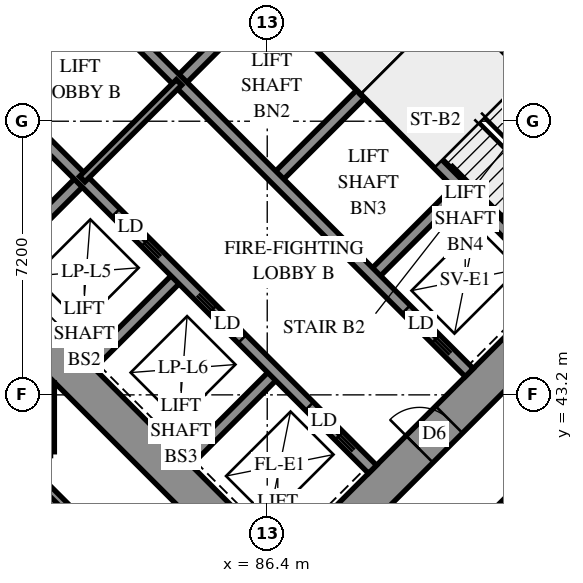
"""IFC4 building model, lengths in metres.
Left out: names, types, materials, properties, quantities, classifications, styles, units other than length and angle.
Written with IfcOpenShell. Run it as: python <this file> out.ifc"""

import sys

from ifc_helpers import new_model, si_unit, direction, frame, frame_2d, origin, place, context, subcontext, project, spatial, polyline, rectangle, outline, extrude, element, fill, save


model = new_model("IFC4")
c1 = context("Model", 3, precision=1e-05, world=origin(), true_north=direction((0.0, 1.0)))
c2 = subcontext(c1, "Body", "Model", "MODEL_VIEW")
j1 = project(units=[si_unit("LENGTHUNIT", "METRE"), si_unit("PLANEANGLEUNIT", "RADIAN")], contexts=[c1])
p1 = place(None, origin())
s1 = spatial("IfcSite", under=j1, at=p1, CompositionType="ELEMENT")
p2 = place(p1, origin())
s2 = spatial("IfcBuilding", under=s1, at=p2, CompositionType="ELEMENT")
p3 = place(p2, frame((0.0, 0.0, 10.2)))
s3 = spatial("IfcBuildingStorey", under=s2, at=p3, CompositionType="ELEMENT", Elevation=10.2)
p4 = place(p3, frame((75.594, 49.443, -0.4), z_axis=(0.0, 0.0, 1.0), x_axis=(0.7071037324, -0.70710983, 0.0)))
e1 = element("IfcWall", 1, at=p4, inside=s3, PredefinedType="SHEAR", context=c2, shape_type="SweptSolid", body=[
    extrude(rectangle(XDim=16.4, YDim=1.0, at=frame_2d((8.2, 0.0))), origin(), (0.0, 0.0, 1.0), 3.5),
])
p5 = place(p3, frame((86.483, 60.333, -0.4), z_axis=(0.0, 0.0, 1.0), x_axis=(0.70710983, -0.7071037324, 0.0)))
e2 = element("IfcWall", 2, at=p5, inside=s3, PredefinedType="SHEAR", context=c2, shape_type="SweptSolid", body=[
    extrude(rectangle(XDim=16.4, YDim=1.0, at=frame_2d((8.2, 0.0))), origin(), (0.0, 0.0, 1.0), 3.5),
])
p6 = place(p5, frame((11.0, 0.0, 0.4)))
e3 = element("IfcOpeningElement", 3, at=p6, cuts=e2, PredefinedType="OPENING", context=c2, shape_type="SweptSolid", body=[
    extrude(rectangle(XDim=0.8, YDim=2.1, at=frame_2d((0.4, 1.05))), frame((0.0, 0.51, 0.0), z_axis=(0.0, -1.0, 0.0), x_axis=(1.0, 0.0, 0.0)), (0.0, 0.0, 1.0), 1.02),
])
p7 = place(p3, frame((76.301, 49.443, -0.4), z_axis=(0.0, 0.0, 1.0), x_axis=(0.7071067812, 0.7071067812, 0.0)))
e4 = element("IfcWall", 4, at=p7, inside=s3, PredefinedType="SHEAR", context=c2, shape_type="SweptSolid", body=[
    extrude(rectangle(XDim=14.4, YDim=1.0, at=frame_2d((7.2, 0.0))), origin(), (0.0, 0.0, 1.0), 3.5),
])
p8 = place(p7, frame((4.55, 0.0, 0.4)))
e5 = element("IfcOpeningElement", 5, at=p8, cuts=e4, PredefinedType="OPENING", context=c2, shape_type="SweptSolid", body=[
    extrude(rectangle(XDim=1.1, YDim=2.1, at=frame_2d((0.55, 1.05))), frame((0.0, 0.51, 0.0), z_axis=(0.0, -1.0, 0.0), x_axis=(1.0, 0.0, 0.0)), (0.0, 0.0, 1.0), 1.02),
])
p9 = place(p7, frame((11.35, 0.0, 0.4)))
e6 = element("IfcOpeningElement", 6, at=p9, cuts=e4, PredefinedType="OPENING", context=c2, shape_type="SweptSolid", body=[
    extrude(rectangle(XDim=1.1, YDim=2.1, at=frame_2d((0.55, 1.05))), frame((0.0, 0.51, 0.0), z_axis=(0.0, -1.0, 0.0), x_axis=(1.0, 0.0, 0.0)), (0.0, 0.0, 1.0), 1.02),
])
p10 = place(p3, frame((87.19, 38.554, -0.4), z_axis=(0.0, 0.0, 1.0), x_axis=(0.707103309, 0.7071102534, 0.0)))
e7 = element("IfcWall", 7, at=p10, inside=s3, PredefinedType="SHEAR", context=c2, shape_type="SweptSolid", body=[
    extrude(rectangle(XDim=14.4, YDim=1.0, at=frame_2d((7.2, 0.0))), origin(), (0.0, 0.0, 1.0), 3.5),
])
p11 = place(p10, frame((4.55, 0.0, 0.4)))
e8 = element("IfcOpeningElement", 8, at=p11, cuts=e7, PredefinedType="OPENING", context=c2, shape_type="SweptSolid", body=[
    extrude(rectangle(XDim=1.1, YDim=2.1, at=frame_2d((0.55, 1.05))), frame((0.0, 0.51, 0.0), z_axis=(0.0, -1.0, 0.0), x_axis=(1.0, 0.0, 0.0)), (0.0, 0.0, 1.0), 1.02),
])
p12 = place(p10, frame((11.35, 0.0, 0.4)))
e9 = element("IfcOpeningElement", 9, at=p12, cuts=e7, PredefinedType="OPENING", context=c2, shape_type="SweptSolid", body=[
    extrude(rectangle(XDim=1.1, YDim=2.1, at=frame_2d((0.55, 1.05))), frame((0.0, 0.51, 0.0), z_axis=(0.0, -1.0, 0.0), x_axis=(1.0, 0.0, 0.0)), (0.0, 0.0, 1.0), 1.02),
])
for number, where, z_axis, x_axis in (
    (10, (79.2, 46.544, 0.0), (0.0, 0.0, 1.0), (0.707, 0.707, 0.0)),
    (11, (84.079, 51.423, 0.0), (0.0, 0.0, 1.0), (0.707, 0.707, 0.0)),
):
    element("IfcWall", number, at=place(p3, frame(where, z_axis=z_axis, x_axis=x_axis)), inside=s3, PredefinedType="SOLIDWALL", context=c2, shape_type="SweptSolid", body=[
        extrude(rectangle(XDim=3.3, YDim=0.3, at=frame_2d((1.65, 0.0))), origin(), (0.0, 0.0, 1.0), 3.8),
    ])
p13 = place(p3, frame((81.746, 43.999, 0.0), z_axis=(0.0, 0.0, 1.0), x_axis=(0.7071067812, 0.7071067812, 0.0)))
e12 = element("IfcWall", 12, at=p13, inside=s3, PredefinedType="SOLIDWALL", context=c2, shape_type="SweptSolid", body=[
    extrude(rectangle(XDim=3.3, YDim=0.3, at=frame_2d((1.65, 0.0))), origin(), (0.0, 0.0, 1.0), 3.8),
])
p14 = place(p3, frame((86.625, 48.878, 0.0), z_axis=(0.0, 0.0, 1.0), x_axis=(0.7071067812, 0.7071067812, 0.0)))
e13 = element("IfcWall", 13, at=p14, inside=s3, PredefinedType="SOLIDWALL", context=c2, shape_type="SweptSolid", body=[
    extrude(rectangle(XDim=3.3, YDim=0.3, at=frame_2d((1.65, 0.0))), origin(), (0.0, 0.0, 1.0), 3.8),
])
p15 = place(p3, frame((84.291, 41.453, 0.0), z_axis=(0.0, 0.0, 1.0), x_axis=(0.7071067812, 0.7071067812, 0.0)))
e14 = element("IfcWall", 14, at=p15, inside=s3, PredefinedType="SOLIDWALL", context=c2, shape_type="SweptSolid", body=[
    extrude(rectangle(XDim=3.3, YDim=0.3, at=frame_2d((1.65, 0.0))), origin(), (0.0, 0.0, 1.0), 3.8),
])
p16 = place(p3, frame((89.17, 46.332, 0.0), z_axis=(0.0, 0.0, 1.0), x_axis=(0.7071067812, 0.7071067812, 0.0)))
e15 = element("IfcWall", 15, at=p16, inside=s3, PredefinedType="SOLIDWALL", context=c2, shape_type="SweptSolid", body=[
    extrude(rectangle(XDim=3.3, YDim=0.3, at=frame_2d((1.65, 0.0))), origin(), (0.0, 0.0, 1.0), 3.8),
])
p17 = place(p3, frame((78.988, 51.423, 0.0), z_axis=(0.0, 0.0, 1.0), x_axis=(0.7071067812, -0.7071067812, 0.0)))
e16 = element("IfcWall", 16, at=p17, inside=s3, PredefinedType="SOLIDWALL", context=c2, shape_type="SweptSolid", body=[
    extrude(rectangle(XDim=14.4, YDim=0.3, at=frame_2d((7.2, 0.0))), origin(), (0.0, 0.0, 1.0), 3.8),
])
p18 = place(p17, frame((1.25, 0.0, 0.0)))
e17 = element("IfcOpeningElement", 17, at=p18, cuts=e16, PredefinedType="OPENING", context=c2, shape_type="SweptSolid", body=[
    extrude(rectangle(XDim=1.1, YDim=2.1, at=frame_2d((0.55, 1.05))), frame((0.0, 0.16, 0.0), z_axis=(0.0, -1.0, 0.0), x_axis=(1.0, 0.0, 0.0)), (0.0, 0.0, 1.0), 0.32),
])
p19 = place(p17, frame((4.85, 0.0, 0.0)))
e18 = element("IfcOpeningElement", 18, at=p19, cuts=e16, PredefinedType="OPENING", context=c2, shape_type="SweptSolid", body=[
    extrude(rectangle(XDim=1.1, YDim=2.1, at=frame_2d((0.55, 1.05))), frame((0.0, 0.16, 0.0), z_axis=(0.0, -1.0, 0.0), x_axis=(1.0, 0.0, 0.0)), (0.0, 0.0, 1.0), 0.32),
])
p20 = place(p17, frame((8.45, 0.0, 0.0)))
e19 = element("IfcOpeningElement", 19, at=p20, cuts=e16, PredefinedType="OPENING", context=c2, shape_type="SweptSolid", body=[
    extrude(rectangle(XDim=1.1, YDim=2.1, at=frame_2d((0.55, 1.05))), frame((0.0, 0.16, 0.0), z_axis=(0.0, -1.0, 0.0), x_axis=(1.0, 0.0, 0.0)), (0.0, 0.0, 1.0), 0.32),
])
p21 = place(p17, frame((12.05, 0.0, 0.0)))
e20 = element("IfcOpeningElement", 20, at=p21, cuts=e16, PredefinedType="OPENING", context=c2, shape_type="SweptSolid", body=[
    extrude(rectangle(XDim=1.1, YDim=2.1, at=frame_2d((0.55, 1.05))), frame((0.0, 0.16, 0.0), z_axis=(0.0, -1.0, 0.0), x_axis=(1.0, 0.0, 0.0)), (0.0, 0.0, 1.0), 0.32),
])
p22 = place(p3, frame((81.534, 53.969, 0.0), z_axis=(0.0, 0.0, 1.0), x_axis=(0.707103309, -0.7071102534, 0.0)))
e21 = element("IfcWall", 21, at=p22, inside=s3, PredefinedType="SOLIDWALL", context=c2, shape_type="SweptSolid", body=[
    extrude(rectangle(XDim=14.4, YDim=0.3, at=frame_2d((7.2, 0.0))), origin(), (0.0, 0.0, 1.0), 3.8),
])
p23 = place(p22, frame((12.05, 0.0, 0.0)))
e22 = element("IfcOpeningElement", 22, at=p23, cuts=e21, PredefinedType="OPENING", context=c2, shape_type="SweptSolid", body=[
    extrude(rectangle(XDim=1.1, YDim=2.1, at=frame_2d((0.55, 1.05))), frame((0.0, 0.16, 0.0), z_axis=(0.0, -1.0, 0.0), x_axis=(1.0, 0.0, 0.0)), (0.0, 0.0, 1.0), 0.32),
])
for number, where, z_axis, x_axis in (
    (23, (83.867, 56.302, 0.0), (0.0, 0.0, 1.0), (0.707, -0.707, 0.0)),
    (24, (88.958, 51.211, 0.0), (0.0, 0.0, 1.0), (0.707, -0.707, 0.0)),
):
    element("IfcWall", number, at=place(p3, frame(where, z_axis=z_axis, x_axis=x_axis)), inside=s3, PredefinedType="SOLIDWALL", context=c2, shape_type="SweptSolid", body=[
        extrude(rectangle(XDim=7.2, YDim=0.3, at=frame_2d((3.6, 0.0))), origin(), (0.0, 0.0, 1.0), 3.8),
    ])
p24 = place(p3, frame((88.958, 51.211, 0.0), z_axis=(0.0, 0.0, 1.0), x_axis=(0.7071067812, 0.7071067812, 0.0)))
e25 = element("IfcWall", 25, at=p24, inside=s3, PredefinedType="SOLIDWALL", context=c2, shape_type="SweptSolid", body=[
    extrude(rectangle(XDim=4.2, YDim=0.3, at=frame_2d((2.1, 0.0))), origin(), (0.0, 0.0, 1.0), 3.8),
])
p25 = place(p3, frame((117.843, 34.665, 0.0), z_axis=(0.0, 0.0, 1.0), x_axis=(-0.7071067812, 0.7071067812, 0.0)))
e26 = element("IfcWall", 26, at=p25, inside=s3, PredefinedType="SOLIDWALL", context=c2, shape_type="SweptSolid", body=[
    extrude(outline(polyline([(-0.275, -0.275), (54.222, -0.275), (53.994, 0.275), (0.275, 0.275), (-0.275, -0.275)])), origin(), (0.0, 0.0, 1.0), 3.8),
])
p26 = place(p25, frame((0.8, 0.0, 0.7)))
e27 = element("IfcOpeningElement", 27, at=p26, cuts=e26, PredefinedType="OPENING", context=c2, shape_type="SweptSolid", body=[
    extrude(rectangle(XDim=1.8, YDim=2.6, at=frame_2d((0.9, 1.3))), frame((0.0, 0.285, 0.0), z_axis=(0.0, -1.0, 0.0), x_axis=(1.0, 0.0, 0.0)), (0.0, 0.0, 1.0), 0.57),
])
p27 = place(p25, frame((4.225, 0.0, 0.7)))
e28 = element("IfcOpeningElement", 28, at=p27, cuts=e26, PredefinedType="OPENING", context=c2, shape_type="SweptSolid", body=[
    extrude(rectangle(XDim=1.8, YDim=2.6, at=frame_2d((0.9, 1.3))), frame((0.0, 0.285, 0.0), z_axis=(0.0, -1.0, 0.0), x_axis=(1.0, 0.0, 0.0)), (0.0, 0.0, 1.0), 0.57),
])
p28 = place(p25, frame((7.825, 0.0, 0.7)))
e29 = element("IfcOpeningElement", 29, at=p28, cuts=e26, PredefinedType="OPENING", context=c2, shape_type="SweptSolid", body=[
    extrude(rectangle(XDim=1.8, YDim=2.6, at=frame_2d((0.9, 1.3))), frame((0.0, 0.285, 0.0), z_axis=(0.0, -1.0, 0.0), x_axis=(1.0, 0.0, 0.0)), (0.0, 0.0, 1.0), 0.57),
])
p29 = place(p25, frame((11.425, 0.0, 0.7)))
e30 = element("IfcOpeningElement", 30, at=p29, cuts=e26, PredefinedType="OPENING", context=c2, shape_type="SweptSolid", body=[
    extrude(rectangle(XDim=1.8, YDim=2.6, at=frame_2d((0.9, 1.3))), frame((0.0, 0.285, 0.0), z_axis=(0.0, -1.0, 0.0), x_axis=(1.0, 0.0, 0.0)), (0.0, 0.0, 1.0), 0.57),
])
p30 = place(p25, frame((15.025, 0.0, 0.7)))
e31 = element("IfcOpeningElement", 31, at=p30, cuts=e26, PredefinedType="OPENING", context=c2, shape_type="SweptSolid", body=[
    extrude(rectangle(XDim=1.8, YDim=2.6, at=frame_2d((0.9, 1.3))), frame((0.0, 0.285, 0.0), z_axis=(0.0, -1.0, 0.0), x_axis=(1.0, 0.0, 0.0)), (0.0, 0.0, 1.0), 0.57),
])
p31 = place(p25, frame((18.625, 0.0, 0.7)))
e32 = element("IfcOpeningElement", 32, at=p31, cuts=e26, PredefinedType="OPENING", context=c2, shape_type="SweptSolid", body=[
    extrude(rectangle(XDim=1.8, YDim=2.6, at=frame_2d((0.9, 1.3))), frame((0.0, 0.285, 0.0), z_axis=(0.0, -1.0, 0.0), x_axis=(1.0, 0.0, 0.0)), (0.0, 0.0, 1.0), 0.57),
])
p32 = place(p25, frame((22.225, 0.0, 0.7)))
e33 = element("IfcOpeningElement", 33, at=p32, cuts=e26, PredefinedType="OPENING", context=c2, shape_type="SweptSolid", body=[
    extrude(rectangle(XDim=1.8, YDim=2.6, at=frame_2d((0.9, 1.3))), frame((0.0, 0.285, 0.0), z_axis=(0.0, -1.0, 0.0), x_axis=(1.0, 0.0, 0.0)), (0.0, 0.0, 1.0), 0.57),
])
p33 = place(p25, frame((25.825, 0.0, 0.7)))
e34 = element("IfcOpeningElement", 34, at=p33, cuts=e26, PredefinedType="OPENING", context=c2, shape_type="SweptSolid", body=[
    extrude(rectangle(XDim=1.8, YDim=2.6, at=frame_2d((0.9, 1.3))), frame((0.0, 0.285, 0.0), z_axis=(0.0, -1.0, 0.0), x_axis=(1.0, 0.0, 0.0)), (0.0, 0.0, 1.0), 0.57),
])
p34 = place(p25, frame((29.425, 0.0, 0.7)))
e35 = element("IfcOpeningElement", 35, at=p34, cuts=e26, PredefinedType="OPENING", context=c2, shape_type="SweptSolid", body=[
    extrude(rectangle(XDim=1.8, YDim=2.6, at=frame_2d((0.9, 1.3))), frame((0.0, 0.285, 0.0), z_axis=(0.0, -1.0, 0.0), x_axis=(1.0, 0.0, 0.0)), (0.0, 0.0, 1.0), 0.57),
])
p35 = place(p25, frame((33.025, 0.0, 0.7)))
e36 = element("IfcOpeningElement", 36, at=p35, cuts=e26, PredefinedType="OPENING", context=c2, shape_type="SweptSolid", body=[
    extrude(rectangle(XDim=1.8, YDim=2.6, at=frame_2d((0.9, 1.3))), frame((0.0, 0.285, 0.0), z_axis=(0.0, -1.0, 0.0), x_axis=(1.0, 0.0, 0.0)), (0.0, 0.0, 1.0), 0.57),
])
p36 = place(p25, frame((36.625, 0.0, 0.7)))
e37 = element("IfcOpeningElement", 37, at=p36, cuts=e26, PredefinedType="OPENING", context=c2, shape_type="SweptSolid", body=[
    extrude(rectangle(XDim=1.8, YDim=2.6, at=frame_2d((0.9, 1.3))), frame((0.0, 0.285, 0.0), z_axis=(0.0, -1.0, 0.0), x_axis=(1.0, 0.0, 0.0)), (0.0, 0.0, 1.0), 0.57),
])
p37 = place(p25, frame((40.225, 0.0, 0.7)))
e38 = element("IfcOpeningElement", 38, at=p37, cuts=e26, PredefinedType="OPENING", context=c2, shape_type="SweptSolid", body=[
    extrude(rectangle(XDim=1.8, YDim=2.6, at=frame_2d((0.9, 1.3))), frame((0.0, 0.285, 0.0), z_axis=(0.0, -1.0, 0.0), x_axis=(1.0, 0.0, 0.0)), (0.0, 0.0, 1.0), 0.57),
])
p38 = place(p25, frame((43.825, 0.0, 0.7)))
e39 = element("IfcOpeningElement", 39, at=p38, cuts=e26, PredefinedType="OPENING", context=c2, shape_type="SweptSolid", body=[
    extrude(rectangle(XDim=1.8, YDim=2.6, at=frame_2d((0.9, 1.3))), frame((0.0, 0.285, 0.0), z_axis=(0.0, -1.0, 0.0), x_axis=(1.0, 0.0, 0.0)), (0.0, 0.0, 1.0), 0.57),
])
p39 = place(p25, frame((47.425, 0.0, 0.7)))
e40 = element("IfcOpeningElement", 40, at=p39, cuts=e26, PredefinedType="OPENING", context=c2, shape_type="SweptSolid", body=[
    extrude(rectangle(XDim=1.8, YDim=2.6, at=frame_2d((0.9, 1.3))), frame((0.0, 0.285, 0.0), z_axis=(0.0, -1.0, 0.0), x_axis=(1.0, 0.0, 0.0)), (0.0, 0.0, 1.0), 0.57),
])
p40 = place(p25, frame((50.96, 0.0, 0.7)))
e41 = element("IfcOpeningElement", 41, at=p40, cuts=e26, PredefinedType="OPENING", context=c2, shape_type="SweptSolid", body=[
    extrude(rectangle(XDim=1.8, YDim=2.6, at=frame_2d((0.9, 1.3))), frame((0.0, 0.285, 0.0), z_axis=(0.0, -1.0, 0.0), x_axis=(1.0, 0.0, 0.0)), (0.0, 0.0, 1.0), 0.57),
])
p41 = place(p3, frame((77.07, 42.275, 0.0), z_axis=(0.0, 0.0, 1.0), x_axis=(0.7071067812, -0.7071067812, 0.0)))
e42 = element("IfcWall", 42, at=p41, inside=s3, PredefinedType="SOLIDWALL", context=c2, shape_type="SweptSolid", body=[
    extrude(outline(polyline([(0.114, -0.275), (39.288, -0.275), (38.737, 0.275), (-0.114, 0.275), (0.114, -0.275)])), origin(), (0.0, 0.0, 1.0), 3.8),
])
p42 = place(p41, frame((2.837, 0.0, 0.7)))
e43 = element("IfcOpeningElement", 43, at=p42, cuts=e42, PredefinedType="OPENING", context=c2, shape_type="SweptSolid", body=[
    extrude(rectangle(XDim=1.8, YDim=2.6, at=frame_2d((0.9, 1.3))), frame((0.0, 0.285, 0.0), z_axis=(0.0, -1.0, 0.0), x_axis=(1.0, 0.0, 0.0)), (0.0, 0.0, 1.0), 0.57),
])
p43 = place(p41, frame((6.588, 0.0, 0.7)))
e44 = element("IfcOpeningElement", 44, at=p43, cuts=e42, PredefinedType="OPENING", context=c2, shape_type="SweptSolid", body=[
    extrude(rectangle(XDim=1.8, YDim=2.6, at=frame_2d((0.9, 1.3))), frame((0.0, 0.285, 0.0), z_axis=(0.0, -1.0, 0.0), x_axis=(1.0, 0.0, 0.0)), (0.0, 0.0, 1.0), 0.57),
])
p44 = place(p41, frame((10.188, 0.0, 0.7)))
e45 = element("IfcOpeningElement", 45, at=p44, cuts=e42, PredefinedType="OPENING", context=c2, shape_type="SweptSolid", body=[
    extrude(rectangle(XDim=1.8, YDim=2.6, at=frame_2d((0.9, 1.3))), frame((0.0, 0.285, 0.0), z_axis=(0.0, -1.0, 0.0), x_axis=(1.0, 0.0, 0.0)), (0.0, 0.0, 1.0), 0.57),
])
p45 = place(p41, frame((13.787, 0.0, 0.7)))
e46 = element("IfcOpeningElement", 46, at=p45, cuts=e42, PredefinedType="OPENING", context=c2, shape_type="SweptSolid", body=[
    extrude(rectangle(XDim=1.8, YDim=2.6, at=frame_2d((0.9, 1.3))), frame((0.0, 0.285, 0.0), z_axis=(0.0, -1.0, 0.0), x_axis=(1.0, 0.0, 0.0)), (0.0, 0.0, 1.0), 0.57),
])
p46 = place(p41, frame((17.387, 0.0, 0.7)))
e47 = element("IfcOpeningElement", 47, at=p46, cuts=e42, PredefinedType="OPENING", context=c2, shape_type="SweptSolid", body=[
    extrude(rectangle(XDim=1.8, YDim=2.6, at=frame_2d((0.9, 1.3))), frame((0.0, 0.285, 0.0), z_axis=(0.0, -1.0, 0.0), x_axis=(1.0, 0.0, 0.0)), (0.0, 0.0, 1.0), 0.57),
])
p47 = place(p41, frame((20.988, 0.0, 0.7)))
e48 = element("IfcOpeningElement", 48, at=p47, cuts=e42, PredefinedType="OPENING", context=c2, shape_type="SweptSolid", body=[
    extrude(rectangle(XDim=1.8, YDim=2.6, at=frame_2d((0.9, 1.3))), frame((0.0, 0.285, 0.0), z_axis=(0.0, -1.0, 0.0), x_axis=(1.0, 0.0, 0.0)), (0.0, 0.0, 1.0), 0.57),
])
p48 = place(p41, frame((24.587, 0.0, 0.7)))
e49 = element("IfcOpeningElement", 49, at=p48, cuts=e42, PredefinedType="OPENING", context=c2, shape_type="SweptSolid", body=[
    extrude(rectangle(XDim=1.8, YDim=2.6, at=frame_2d((0.9, 1.3))), frame((0.0, 0.285, 0.0), z_axis=(0.0, -1.0, 0.0), x_axis=(1.0, 0.0, 0.0)), (0.0, 0.0, 1.0), 0.57),
])
p49 = place(p41, frame((28.188, 0.0, 0.7)))
e50 = element("IfcOpeningElement", 50, at=p49, cuts=e42, PredefinedType="OPENING", context=c2, shape_type="SweptSolid", body=[
    extrude(rectangle(XDim=1.8, YDim=2.6, at=frame_2d((0.9, 1.3))), frame((0.0, 0.285, 0.0), z_axis=(0.0, -1.0, 0.0), x_axis=(1.0, 0.0, 0.0)), (0.0, 0.0, 1.0), 0.57),
])
p50 = place(p41, frame((31.788, 0.0, 0.7)))
e51 = element("IfcOpeningElement", 51, at=p50, cuts=e42, PredefinedType="OPENING", context=c2, shape_type="SweptSolid", body=[
    extrude(rectangle(XDim=1.8, YDim=2.6, at=frame_2d((0.9, 1.3))), frame((0.0, 0.285, 0.0), z_axis=(0.0, -1.0, 0.0), x_axis=(1.0, 0.0, 0.0)), (0.0, 0.0, 1.0), 0.57),
])
p51 = place(p41, frame((35.388, 0.0, 0.7)))
e52 = element("IfcOpeningElement", 52, at=p51, cuts=e42, PredefinedType="OPENING", context=c2, shape_type="SweptSolid", body=[
    extrude(rectangle(XDim=1.8, YDim=2.6, at=frame_2d((0.9, 1.3))), frame((0.0, 0.285, 0.0), z_axis=(0.0, -1.0, 0.0), x_axis=(1.0, 0.0, 0.0)), (0.0, 0.0, 1.0), 0.57),
])
p52 = place(p3, frame((91.313, 53.354, 0.0), z_axis=(0.0, 0.0, 1.0), x_axis=(0.7071067812, -0.7071067812, 0.0)))
e53 = element("IfcWall", 53, at=p52, inside=s3, PredefinedType="PARTITIONING", context=c2, shape_type="SweptSolid", body=[
    extrude(rectangle(XDim=5.95, YDim=0.15, at=frame_2d((2.975, 0.0))), origin(), (0.0, 0.0, 1.0), 3.8),
])
p53 = place(p3, frame((81.534, 48.878, 0.0), z_axis=(0.0, 0.0, 1.0), x_axis=(0.707092892, 0.7071206701, 0.0)))
e54 = element("IfcWall", 54, at=p53, inside=s3, PredefinedType="PARTITIONING", context=c2, shape_type="SweptSolid", body=[
    extrude(rectangle(XDim=3.6, YDim=0.2, at=frame_2d((1.8, 0.0))), origin(), (0.0, 0.0, 1.0), 3.8),
])
p54 = place(p3, frame((86.376, 33.357, 0.0), z_axis=(0.0, 0.0, 1.0), x_axis=(0.7071019736, 0.7071115887, 0.0)))
e55 = element("IfcWall", 55, at=p54, inside=s3, PredefinedType="PARTITIONING", context=c2, shape_type="SweptSolid", body=[
    extrude(rectangle(XDim=10.4, YDim=0.2, at=frame_2d((5.2, 0.0))), origin(), (0.0, 0.0, 1.0), 3.8),
])
p55 = place(p3, frame((86.836, 34.524, 0.0), z_axis=(0.0, 0.0, 1.0), x_axis=(0.7071067812, 0.7071067812, 0.0)))
e56 = element("IfcWall", 56, at=p55, inside=s3, PredefinedType="PARTITIONING", context=c2, shape_type="SweptSolid", body=[
    extrude(rectangle(XDim=9.249, YDim=0.2, at=frame_2d((4.625, 0.0))), origin(), (0.0, 0.0, 1.0), 3.8),
])
p56 = place(p3, frame((80.007, 41.347, 0.0), z_axis=(0.0, 0.0, 1.0), x_axis=(0.7071067812, -0.7071067812, 0.0)))
e57 = element("IfcWall", 57, at=p56, inside=s3, PredefinedType="PARTITIONING", context=c2, shape_type="SweptSolid", body=[
    extrude(rectangle(XDim=6.206, YDim=0.2, at=frame_2d((3.103, 0.0))), origin(), (0.0, 0.0, 1.0), 3.8),
])
p57 = place(p3, frame((80.7, 41.702, 0.0), z_axis=(0.0, 0.0, 1.0), x_axis=(0.0, 1.0, 0.0)))
e58 = element("IfcWall", 58, at=p57, inside=s3, PredefinedType="PARTITIONING", context=c2, shape_type="SweptSolid", body=[
    extrude(rectangle(XDim=1.814, YDim=0.2, at=frame_2d((0.907, 0.0))), origin(), (0.0, 0.0, 1.0), 3.8),
])
p58 = place(p11, origin())
e59 = element("IfcDoor", 59, at=p58, inside=s3, OperationType="DOUBLE_DOOR_SINGLE_SWING", PredefinedType="DOOR", context=c2, shape_type="SweptSolid", body=[
    extrude(rectangle(XDim=1.1, YDim=2.1, at=frame_2d((0.55, 1.05))), frame((0.0, 0.025, 0.0), z_axis=(0.0, -1.0, 0.0), x_axis=(1.0, 0.0, 0.0)), (0.0, 0.0, 1.0), 0.05),
])
fill(e8, e59)
p59 = place(p19, origin())
e60 = element("IfcDoor", 60, at=p59, inside=s3, OperationType="SLIDING_TO_RIGHT", PredefinedType="DOOR", context=c2, shape_type="SweptSolid", body=[
    extrude(rectangle(XDim=1.1, YDim=2.1, at=frame_2d((0.55, 1.05))), frame((0.0, 0.025, 0.0), z_axis=(0.0, -1.0, 0.0), x_axis=(1.0, 0.0, 0.0)), (0.0, 0.0, 1.0), 0.05),
])
fill(e18, e60)
p60 = place(p20, origin())
e61 = element("IfcDoor", 61, at=p60, inside=s3, OperationType="SLIDING_TO_LEFT", PredefinedType="DOOR", context=c2, shape_type="SweptSolid", body=[
    extrude(rectangle(XDim=1.1, YDim=2.1, at=frame_2d((0.55, 1.05))), frame((0.0, 0.025, 0.0), z_axis=(0.0, -1.0, 0.0), x_axis=(1.0, 0.0, 0.0)), (0.0, 0.0, 1.0), 0.05),
])
fill(e19, e61)
p61 = place(p21, origin())
e62 = element("IfcDoor", 62, at=p61, inside=s3, OperationType="SLIDING_TO_RIGHT", PredefinedType="DOOR", context=c2, shape_type="SweptSolid", body=[
    extrude(rectangle(XDim=1.1, YDim=2.1, at=frame_2d((0.55, 1.05))), frame((0.0, 0.025, 0.0), z_axis=(0.0, -1.0, 0.0), x_axis=(1.0, 0.0, 0.0)), (0.0, 0.0, 1.0), 0.05),
])
fill(e20, e62)
p62 = place(p23, origin())
e63 = element("IfcDoor", 63, at=p62, inside=s3, OperationType="SLIDING_TO_RIGHT", PredefinedType="DOOR", context=c2, shape_type="SweptSolid", body=[
    extrude(rectangle(XDim=1.1, YDim=2.1, at=frame_2d((0.55, 1.05))), frame((0.0, 0.025, 0.0), z_axis=(0.0, -1.0, 0.0), x_axis=(1.0, 0.0, 0.0)), (0.0, 0.0, 1.0), 0.05),
])
fill(e22, e63)
save(model, sys.argv[1])
